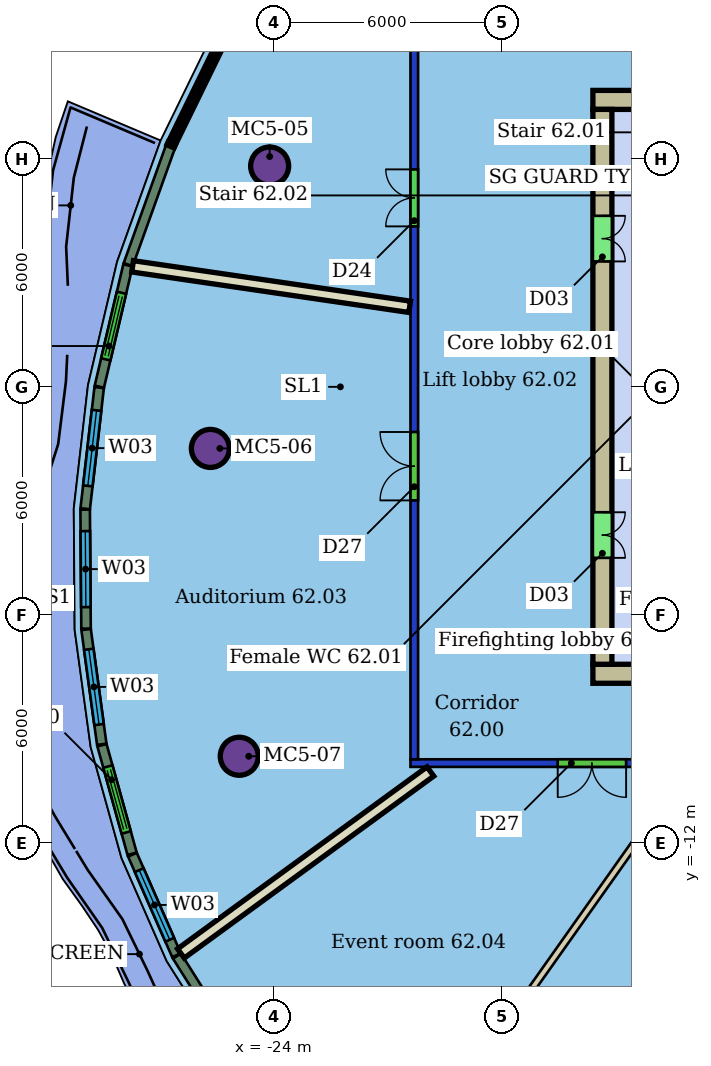
"""IFC4 building model, lengths in metres.
Left out: names, types, materials, properties, quantities, classifications, styles, units other than length and angle.
Written with IfcOpenShell. Run it as: python <this file> out.ifc"""

import sys

from ifc_helpers import new_model, si_unit, direction, frame, frame_2d, origin, origin_2d, place, context, subcontext, project, spatial, rectangle, hollow_circle, extrude, element, fill, save


model = new_model("IFC4")
c1 = context("Model", 3, precision=1e-05, world=origin(), true_north=direction((0.0, 1.0)))
c2 = subcontext(c1, "Body", "Model", "MODEL_VIEW")
j1 = project(units=[si_unit("LENGTHUNIT", "METRE"), si_unit("PLANEANGLEUNIT", "RADIAN")], contexts=[c1])
p1 = place(None, origin())
s1 = spatial("IfcSite", under=j1, at=p1, CompositionType="ELEMENT")
p2 = place(p1, origin())
s2 = spatial("IfcBuilding", under=s1, at=p2, CompositionType="ELEMENT")
p3 = place(p2, frame((0.0, 0.0, 254.1)))
s3 = spatial("IfcBuildingStorey", under=s2, at=p3, CompositionType="ELEMENT", Elevation=254.1)
for number, where, z_axis, x_axis in (
    (1, (-24.106, 5.81, 0.0), (0.0, 0.0, 1.0), (1.0, 0.0, 0.0)),
    (2, (-25.666, -1.62, 0.0), (0.0, 0.0, 1.0), (1.0, 0.0, 0.0)),
    (3, (-24.906, -9.72, 0.0), (0.0, 0.0, 1.0), (1.0, 0.0, 0.0)),
):
    element("IfcColumn", number, at=place(p3, frame(where, z_axis=z_axis, x_axis=x_axis)), inside=s3, PredefinedType="COLUMN", context=c2, shape_type="SweptSolid", body=[
        extrude(hollow_circle(Radius=0.5, WallThickness=0.04, at=origin_2d()), origin(), (0.0, 0.0, 1.0), 3.45),
    ])
p4 = place(p3, frame((8.4, -9.9, 0.0), z_axis=(0.0, 0.0, 1.0), x_axis=(-1.0, 0.0, 0.0)))
e4 = element("IfcWall", 4, at=p4, inside=s3, PredefinedType="PARTITIONING", context=c2, shape_type="SweptSolid", body=[
    extrude(rectangle(XDim=28.8, YDim=0.2, at=frame_2d((14.4, 0.0))), origin(), (0.0, 0.0, 1.0), 3.1),
])
p5 = place(p4, frame((23.126, 0.0, 0.0)))
e5 = element("IfcOpeningElement", 5, at=p5, cuts=e4, PredefinedType="OPENING", context=c2, shape_type="SweptSolid", body=[
    extrude(rectangle(XDim=1.8, YDim=2.4, at=frame_2d((0.9, 1.2))), frame((0.0, 0.11, 0.0), z_axis=(0.0, -1.0, 0.0), x_axis=(1.0, 0.0, 0.0)), (0.0, 0.0, 1.0), 0.22),
])
p6 = place(p4, frame((17.523, 0.0, 0.0)))
e6 = element("IfcOpeningElement", 6, at=p6, cuts=e4, PredefinedType="OPENING", context=c2, shape_type="SweptSolid", body=[
    extrude(rectangle(XDim=1.5, YDim=2.4, at=frame_2d((0.75, 1.2))), frame((0.0, 0.11, 0.0), z_axis=(0.0, -1.0, 0.0), x_axis=(1.0, 0.0, 0.0)), (0.0, 0.0, 1.0), 0.22),
])
p7 = place(p4, frame((8.52, 0.0, 0.0)))
e7 = element("IfcOpeningElement", 7, at=p7, cuts=e4, PredefinedType="OPENING", context=c2, shape_type="SweptSolid", body=[
    extrude(rectangle(XDim=0.9, YDim=2.1, at=frame_2d((0.45, 1.05))), frame((0.0, 0.11, 0.0), z_axis=(0.0, -1.0, 0.0), x_axis=(1.0, 0.0, 0.0)), (0.0, 0.0, 1.0), 0.22),
])
p8 = place(p4, frame((3.68, 0.0, 0.0)))
e8 = element("IfcOpeningElement", 8, at=p8, cuts=e4, PredefinedType="OPENING", context=c2, shape_type="SweptSolid", body=[
    extrude(rectangle(XDim=1.5, YDim=2.1, at=frame_2d((0.75, 1.05))), frame((0.0, 0.11, 0.0), z_axis=(0.0, -1.0, 0.0), x_axis=(1.0, 0.0, 0.0)), (0.0, 0.0, 1.0), 0.22),
])
p9 = place(p3, frame((-20.3, -9.8, 0.0), z_axis=(0.0, 0.0, 1.0), x_axis=(0.0, 1.0, 0.0)))
e9 = element("IfcWall", 9, at=p9, inside=s3, PredefinedType="PARTITIONING", context=c2, shape_type="SweptSolid", body=[
    extrude(rectangle(XDim=19.6, YDim=0.2, at=frame_2d((9.8, 0.0))), origin(), (0.0, 0.0, 1.0), 3.1),
])
p10 = place(p9, frame((14.022, 0.0, 0.0)))
e10 = element("IfcOpeningElement", 10, at=p10, cuts=e9, PredefinedType="OPENING", context=c2, shape_type="SweptSolid", body=[
    extrude(rectangle(XDim=1.5, YDim=2.1, at=frame_2d((0.75, 1.05))), frame((0.0, 0.11, 0.0), z_axis=(0.0, -1.0, 0.0), x_axis=(1.0, 0.0, 0.0)), (0.0, 0.0, 1.0), 0.22),
])
p11 = place(p9, frame((6.812, 0.0, 0.0)))
e11 = element("IfcOpeningElement", 11, at=p11, cuts=e9, PredefinedType="OPENING", context=c2, shape_type="SweptSolid", body=[
    extrude(rectangle(XDim=1.8, YDim=2.4, at=frame_2d((0.9, 1.2))), frame((0.0, 0.11, 0.0), z_axis=(0.0, -1.0, 0.0), x_axis=(1.0, 0.0, 0.0)), (0.0, 0.0, 1.0), 0.22),
])
p12 = place(p3, frame((-27.712, 3.171, 0.0), z_axis=(0.0, 0.0, 1.0), x_axis=(0.98950467143, -0.144500883103, 0.0)))
e12 = element("IfcWall", 12, at=p12, inside=s3, PredefinedType="PARTITIONING", context=c2, shape_type="SweptSolid", body=[
    extrude(rectangle(XDim=7.368, YDim=0.3, at=frame_2d((3.684, 0.0))), origin(), (0.0, 0.0, 1.0), 3.45),
])
p13 = place(p3, frame((-26.44, -14.909, 0.0), z_axis=(0.0, 0.0, 1.0), x_axis=(0.807908876314, 0.589307430441, 0.0)))
e13 = element("IfcWall", 13, at=p13, inside=s3, PredefinedType="PARTITIONING", context=c2, shape_type="SweptSolid", body=[
    extrude(rectangle(XDim=8.125, YDim=0.3, at=frame_2d((4.062, 0.0))), origin(), (0.0, 0.0, 1.0), 3.45),
])
p14 = place(p3, frame((-20.981, -21.174, 0.0), z_axis=(0.0, 0.0, 1.0), x_axis=(0.577574818001, 0.816337754615, 0.0)))
e14 = element("IfcWall", 14, at=p14, inside=s3, PredefinedType="PARTITIONING", context=c2, shape_type="SweptSolid", body=[
    extrude(rectangle(XDim=13.626, YDim=0.175, at=frame_2d((6.813, 0.0))), origin(), (0.0, 0.0, 1.0), 3.45),
])
p15 = place(p3, frame((-26.718, 6.313, 0.0), z_axis=(0.0, 0.0, 1.0), x_axis=(-0.337652360294, -0.941270887464, 0.0)))
e15 = element("IfcWall", 15, at=p15, inside=s3, PredefinedType="SOLIDWALL", context=c2, shape_type="SweptSolid", body=[
    extrude(rectangle(XDim=3.29, YDim=0.25, at=frame_2d((1.645, 0.0))), origin(), (0.0, 0.0, 1.0), 3.15),
])
p16 = place(p3, frame((-27.835, 3.196, 0.0), z_axis=(0.0, 0.0, 1.0), x_axis=(-0.229620288748, -0.973280290048, 0.0)))
e16 = element("IfcWall", 16, at=p16, inside=s3, PredefinedType="SOLIDWALL", context=c2, shape_type="SweptSolid", body=[
    extrude(rectangle(XDim=3.279, YDim=0.25, at=frame_2d((1.64, 0.0))), origin(), (0.0, 0.0, 1.0), 3.15),
])
p17 = place(p16, frame((0.74, 0.0, 0.0)))
e17 = element("IfcOpeningElement", 17, at=p17, cuts=e16, PredefinedType="OPENING", context=c2, shape_type="SweptSolid", body=[
    extrude(rectangle(XDim=1.8, YDim=2.4, at=frame_2d((0.9, 1.2))), frame((0.0, 0.135, 0.0), z_axis=(0.0, -1.0, 0.0), x_axis=(1.0, 0.0, 0.0)), (0.0, 0.0, 1.0), 0.27),
])
p18 = place(p3, frame((-28.592, -0.018, 0.0), z_axis=(0.0, 0.0, 1.0), x_axis=(-0.114612561175, -0.993410268127, 0.0)))
e18 = element("IfcWall", 18, at=p18, inside=s3, PredefinedType="SOLIDWALL", context=c2, shape_type="SweptSolid", body=[
    extrude(rectangle(XDim=3.21, YDim=0.25, at=frame_2d((1.605, 0.0))), origin(), (0.0, 0.0, 1.0), 3.15),
])
p19 = place(p18, frame((0.605, 0.0, 0.9)))
e19 = element("IfcOpeningElement", 19, at=p19, cuts=e18, PredefinedType="OPENING", context=c2, shape_type="SweptSolid", body=[
    extrude(rectangle(XDim=2.0, YDim=2.1, at=frame_2d((1.0, 1.05))), frame((0.0, 0.135, 0.0), z_axis=(0.0, -1.0, 0.0), x_axis=(1.0, 0.0, 0.0)), (0.0, 0.0, 1.0), 0.27),
])
p20 = place(p3, frame((-28.961, -3.23, 0.0), z_axis=(0.0, 0.0, 1.0), x_axis=(0.007406626712, -0.999972570564, 0.0)))
e20 = element("IfcWall", 20, at=p20, inside=s3, PredefinedType="SOLIDWALL", context=c2, shape_type="SweptSolid", body=[
    extrude(rectangle(XDim=3.131, YDim=0.25, at=frame_2d((1.566, 0.0))), origin(), (0.0, 0.0, 1.0), 3.15),
])
p21 = place(p20, frame((0.566, 0.0, 0.9)))
e21 = element("IfcOpeningElement", 21, at=p21, cuts=e20, PredefinedType="OPENING", context=c2, shape_type="SweptSolid", body=[
    extrude(rectangle(XDim=2.0, YDim=2.1, at=frame_2d((1.0, 1.05))), frame((0.0, 0.135, 0.0), z_axis=(0.0, -1.0, 0.0), x_axis=(1.0, 0.0, 0.0)), (0.0, 0.0, 1.0), 0.27),
])
p22 = place(p3, frame((-28.936, -6.386, 0.0), z_axis=(0.0, 0.0, 1.0), x_axis=(0.135295507902, -0.990805291438, 0.0)))
e22 = element("IfcWall", 22, at=p22, inside=s3, PredefinedType="SOLIDWALL", context=c2, shape_type="SweptSolid", body=[
    extrude(rectangle(XDim=3.048, YDim=0.25, at=frame_2d((1.524, 0.0))), origin(), (0.0, 0.0, 1.0), 3.15),
])
p23 = place(p22, frame((0.524, 0.0, 0.9)))
e23 = element("IfcOpeningElement", 23, at=p23, cuts=e22, PredefinedType="OPENING", context=c2, shape_type="SweptSolid", body=[
    extrude(rectangle(XDim=2.0, YDim=2.1, at=frame_2d((1.0, 1.05))), frame((0.0, 0.135, 0.0), z_axis=(0.0, -1.0, 0.0), x_axis=(1.0, 0.0, 0.0)), (0.0, 0.0, 1.0), 0.27),
])
p24 = place(p3, frame((-28.518, -9.43, 0.0), z_axis=(0.0, 0.0, 1.0), x_axis=(0.267622628511, -0.963523808065, 0.0)))
e24 = element("IfcWall", 24, at=p24, inside=s3, PredefinedType="SOLIDWALL", context=c2, shape_type="SweptSolid", body=[
    extrude(rectangle(XDim=2.965, YDim=0.25, at=frame_2d((1.482, 0.0))), origin(), (0.0, 0.0, 1.0), 3.15),
])
p25 = place(p24, frame((0.582, 0.0, 0.0)))
e25 = element("IfcOpeningElement", 25, at=p25, cuts=e24, PredefinedType="OPENING", context=c2, shape_type="SweptSolid", body=[
    extrude(rectangle(XDim=1.8, YDim=2.4, at=frame_2d((0.9, 1.2))), frame((0.0, 0.135, 0.0), z_axis=(0.0, -1.0, 0.0), x_axis=(1.0, 0.0, 0.0)), (0.0, 0.0, 1.0), 0.27),
])
p26 = place(p3, frame((-27.716, -12.311, 0.0), z_axis=(0.0, 0.0, 1.0), x_axis=(0.401639105758, -0.915798028348, 0.0)))
e26 = element("IfcWall", 26, at=p26, inside=s3, PredefinedType="SOLIDWALL", context=c2, shape_type="SweptSolid", body=[
    extrude(rectangle(XDim=2.888, YDim=0.25, at=frame_2d((1.444, 0.0))), origin(), (0.0, 0.0, 1.0), 3.15),
])
p27 = place(p26, frame((0.444, 0.0, 0.9)))
e27 = element("IfcOpeningElement", 27, at=p27, cuts=e26, PredefinedType="OPENING", context=c2, shape_type="SweptSolid", body=[
    extrude(rectangle(XDim=2.0, YDim=2.1, at=frame_2d((1.0, 1.05))), frame((0.0, 0.135, 0.0), z_axis=(0.0, -1.0, 0.0), x_axis=(1.0, 0.0, 0.0)), (0.0, 0.0, 1.0), 0.27),
])
p28 = place(p3, frame((-26.544, -14.979, 0.0), z_axis=(0.0, 0.0, 1.0), x_axis=(0.533094811272, -0.846055507751, 0.0)))
e28 = element("IfcWall", 28, at=p28, inside=s3, PredefinedType="SOLIDWALL", context=c2, shape_type="SweptSolid", body=[
    extrude(rectangle(XDim=2.783, YDim=0.25, at=frame_2d((1.391, 0.0))), origin(), (0.0, 0.0, 1.0), 3.15),
])
p29 = place(p3, frame((-6.0, 7.55, 0.0), z_axis=(0.0, 0.0, 1.0), x_axis=(-1.0, 0.0, 0.0)))
e29 = element("IfcWall", 29, at=p29, inside=s3, PredefinedType="SHEAR", context=c2, shape_type="SweptSolid", body=[
    extrude(rectangle(XDim=9.6, YDim=0.5, at=frame_2d((4.8, 0.0))), origin(), (0.0, 0.0, 1.0), 3.3),
])
p30 = place(p29, frame((5.2, 0.0, 0.0)))
e30 = element("IfcOpeningElement", 30, at=p30, cuts=e29, PredefinedType="OPENING", context=c2, shape_type="SweptSolid", body=[
    extrude(rectangle(XDim=1.2, YDim=2.1, at=frame_2d((0.6, 1.05))), frame((0.0, 0.26, 0.0), z_axis=(0.0, -1.0, 0.0), x_axis=(1.0, 0.0, 0.0)), (0.0, 0.0, 1.0), 0.52),
])
p31 = place(p3, frame((-15.6, -7.55, 0.0), z_axis=(0.0, 0.0, 1.0), x_axis=(1.0, 0.0, 0.0)))
e31 = element("IfcWall", 31, at=p31, inside=s3, PredefinedType="SHEAR", context=c2, shape_type="SweptSolid", body=[
    extrude(rectangle(XDim=19.2, YDim=0.5, at=frame_2d((9.6, 0.0))), origin(), (0.0, 0.0, 1.0), 3.3),
])
p32 = place(p31, frame((3.6, 0.0, 0.0)))
e32 = element("IfcOpeningElement", 32, at=p32, cuts=e31, PredefinedType="OPENING", context=c2, shape_type="SweptSolid", body=[
    extrude(rectangle(XDim=1.2, YDim=2.1, at=frame_2d((0.6, 1.05))), frame((0.0, 0.26, 0.0), z_axis=(0.0, -1.0, 0.0), x_axis=(1.0, 0.0, 0.0)), (0.0, 0.0, 1.0), 0.52),
])
p33 = place(p3, frame((-15.35, 7.3, 0.0), z_axis=(0.0, 0.0, 1.0), x_axis=(0.0, -1.0, 0.0)))
e33 = element("IfcWall", 33, at=p33, inside=s3, PredefinedType="SHEAR", context=c2, shape_type="SweptSolid", body=[
    extrude(rectangle(XDim=14.6, YDim=0.5, at=frame_2d((7.3, 0.0))), origin(), (0.0, 0.0, 1.0), 3.3),
])
p34 = place(p33, frame((10.6, 0.0, 0.0)))
e34 = element("IfcOpeningElement", 34, at=p34, cuts=e33, PredefinedType="OPENING", context=c2, shape_type="SweptSolid", body=[
    extrude(rectangle(XDim=1.2, YDim=2.1, at=frame_2d((0.6, 1.05))), frame((0.0, 0.26, 0.0), z_axis=(0.0, -1.0, 0.0), x_axis=(1.0, 0.0, 0.0)), (0.0, 0.0, 1.0), 0.52),
])
p35 = place(p33, frame((2.8, 0.0, 0.0)))
e35 = element("IfcOpeningElement", 35, at=p35, cuts=e33, PredefinedType="OPENING", context=c2, shape_type="SweptSolid", body=[
    extrude(rectangle(XDim=1.2, YDim=2.1, at=frame_2d((0.6, 1.05))), frame((0.0, 0.26, 0.0), z_axis=(0.0, -1.0, 0.0), x_axis=(1.0, 0.0, 0.0)), (0.0, 0.0, 1.0), 0.52),
])
p36 = place(p10, origin())
e36 = element("IfcDoor", 36, at=p36, inside=s3, OperationType="DOUBLE_DOOR_SINGLE_SWING", PredefinedType="DOOR", context=c2, shape_type="SweptSolid", body=[
    extrude(rectangle(XDim=1.5, YDim=2.1, at=frame_2d((0.75, 1.05))), frame((0.0, 0.025, 0.0), z_axis=(0.0, -1.0, 0.0), x_axis=(1.0, 0.0, 0.0)), (0.0, 0.0, 1.0), 0.05),
])
fill(e10, e36)
p37 = place(p11, origin())
e37 = element("IfcDoor", 37, at=p37, inside=s3, OperationType="DOUBLE_DOOR_SINGLE_SWING", PredefinedType="DOOR", context=c2, shape_type="SweptSolid", body=[
    extrude(rectangle(XDim=1.8, YDim=2.4, at=frame_2d((0.9, 1.2))), frame((0.0, 0.025, 0.0), z_axis=(0.0, -1.0, 0.0), x_axis=(1.0, 0.0, 0.0)), (0.0, 0.0, 1.0), 0.05),
])
fill(e11, e37)
p38 = place(p5, origin())
e38 = element("IfcDoor", 38, at=p38, inside=s3, OperationType="DOUBLE_DOOR_SINGLE_SWING", PredefinedType="DOOR", context=c2, shape_type="SweptSolid", body=[
    extrude(rectangle(XDim=1.8, YDim=2.4, at=frame_2d((0.9, 1.2))), frame((0.0, 0.025, 0.0), z_axis=(0.0, -1.0, 0.0), x_axis=(1.0, 0.0, 0.0)), (0.0, 0.0, 1.0), 0.05),
])
fill(e5, e38)
p39 = place(p17, origin())
e39 = element("IfcDoor", 39, at=p39, inside=s3, OperationType="DOUBLE_DOOR_SLIDING", PredefinedType="DOOR", context=c2, shape_type="SweptSolid", body=[
    extrude(rectangle(XDim=1.8, YDim=2.4, at=frame_2d((0.9, 1.2))), frame((0.0, 0.025, 0.0), z_axis=(0.0, -1.0, 0.0), x_axis=(1.0, 0.0, 0.0)), (0.0, 0.0, 1.0), 0.05),
])
fill(e17, e39)
p40 = place(p19, origin())
e40 = element("IfcWindow", 40, at=p40, inside=s3, PartitioningType="SINGLE_PANEL", PredefinedType="WINDOW", context=c2, shape_type="SweptSolid", body=[
    extrude(rectangle(XDim=2.0, YDim=2.1, at=frame_2d((1.0, 1.05))), frame((0.0, 0.03, 0.0), z_axis=(0.0, -1.0, 0.0), x_axis=(1.0, 0.0, 0.0)), (0.0, 0.0, 1.0), 0.06),
])
fill(e19, e40)
p41 = place(p21, origin())
e41 = element("IfcWindow", 41, at=p41, inside=s3, PartitioningType="SINGLE_PANEL", PredefinedType="WINDOW", context=c2, shape_type="SweptSolid", body=[
    extrude(rectangle(XDim=2.0, YDim=2.1, at=frame_2d((1.0, 1.05))), frame((0.0, 0.03, 0.0), z_axis=(0.0, -1.0, 0.0), x_axis=(1.0, 0.0, 0.0)), (0.0, 0.0, 1.0), 0.06),
])
fill(e21, e41)
p42 = place(p23, origin())
e42 = element("IfcWindow", 42, at=p42, inside=s3, PartitioningType="SINGLE_PANEL", PredefinedType="WINDOW", context=c2, shape_type="SweptSolid", body=[
    extrude(rectangle(XDim=2.0, YDim=2.1, at=frame_2d((1.0, 1.05))), frame((0.0, 0.03, 0.0), z_axis=(0.0, -1.0, 0.0), x_axis=(1.0, 0.0, 0.0)), (0.0, 0.0, 1.0), 0.06),
])
fill(e23, e42)
p43 = place(p25, origin())
e43 = element("IfcDoor", 43, at=p43, inside=s3, OperationType="DOUBLE_DOOR_SLIDING", PredefinedType="DOOR", context=c2, shape_type="SweptSolid", body=[
    extrude(rectangle(XDim=1.8, YDim=2.4, at=frame_2d((0.9, 1.2))), frame((0.0, 0.025, 0.0), z_axis=(0.0, -1.0, 0.0), x_axis=(1.0, 0.0, 0.0)), (0.0, 0.0, 1.0), 0.05),
])
fill(e25, e43)
p44 = place(p27, origin())
e44 = element("IfcWindow", 44, at=p44, inside=s3, PartitioningType="SINGLE_PANEL", PredefinedType="WINDOW", context=c2, shape_type="SweptSolid", body=[
    extrude(rectangle(XDim=2.0, YDim=2.1, at=frame_2d((1.0, 1.05))), frame((0.0, 0.03, 0.0), z_axis=(0.0, -1.0, 0.0), x_axis=(1.0, 0.0, 0.0)), (0.0, 0.0, 1.0), 0.06),
])
fill(e27, e44)
p45 = place(p34, origin())
e45 = element("IfcDoor", 45, at=p45, inside=s3, OperationType="DOUBLE_DOOR_SINGLE_SWING", PredefinedType="NOTDEFINED", context=c2, shape_type="SweptSolid", body=[
    extrude(rectangle(XDim=1.2, YDim=2.1, at=frame_2d((0.6, 1.05))), frame((0.0, 0.025, 0.0), z_axis=(0.0, -1.0, 0.0), x_axis=(1.0, 0.0, 0.0)), (0.0, 0.0, 1.0), 0.05),
])
fill(e34, e45)
p46 = place(p35, origin())
e46 = element("IfcDoor", 46, at=p46, inside=s3, OperationType="DOUBLE_DOOR_SINGLE_SWING", PredefinedType="NOTDEFINED", context=c2, shape_type="SweptSolid", body=[
    extrude(rectangle(XDim=1.2, YDim=2.1, at=frame_2d((0.6, 1.05))), frame((0.0, 0.025, 0.0), z_axis=(0.0, -1.0, 0.0), x_axis=(1.0, 0.0, 0.0)), (0.0, 0.0, 1.0), 0.05),
])
fill(e35, e46)
save(model, sys.argv[1])
